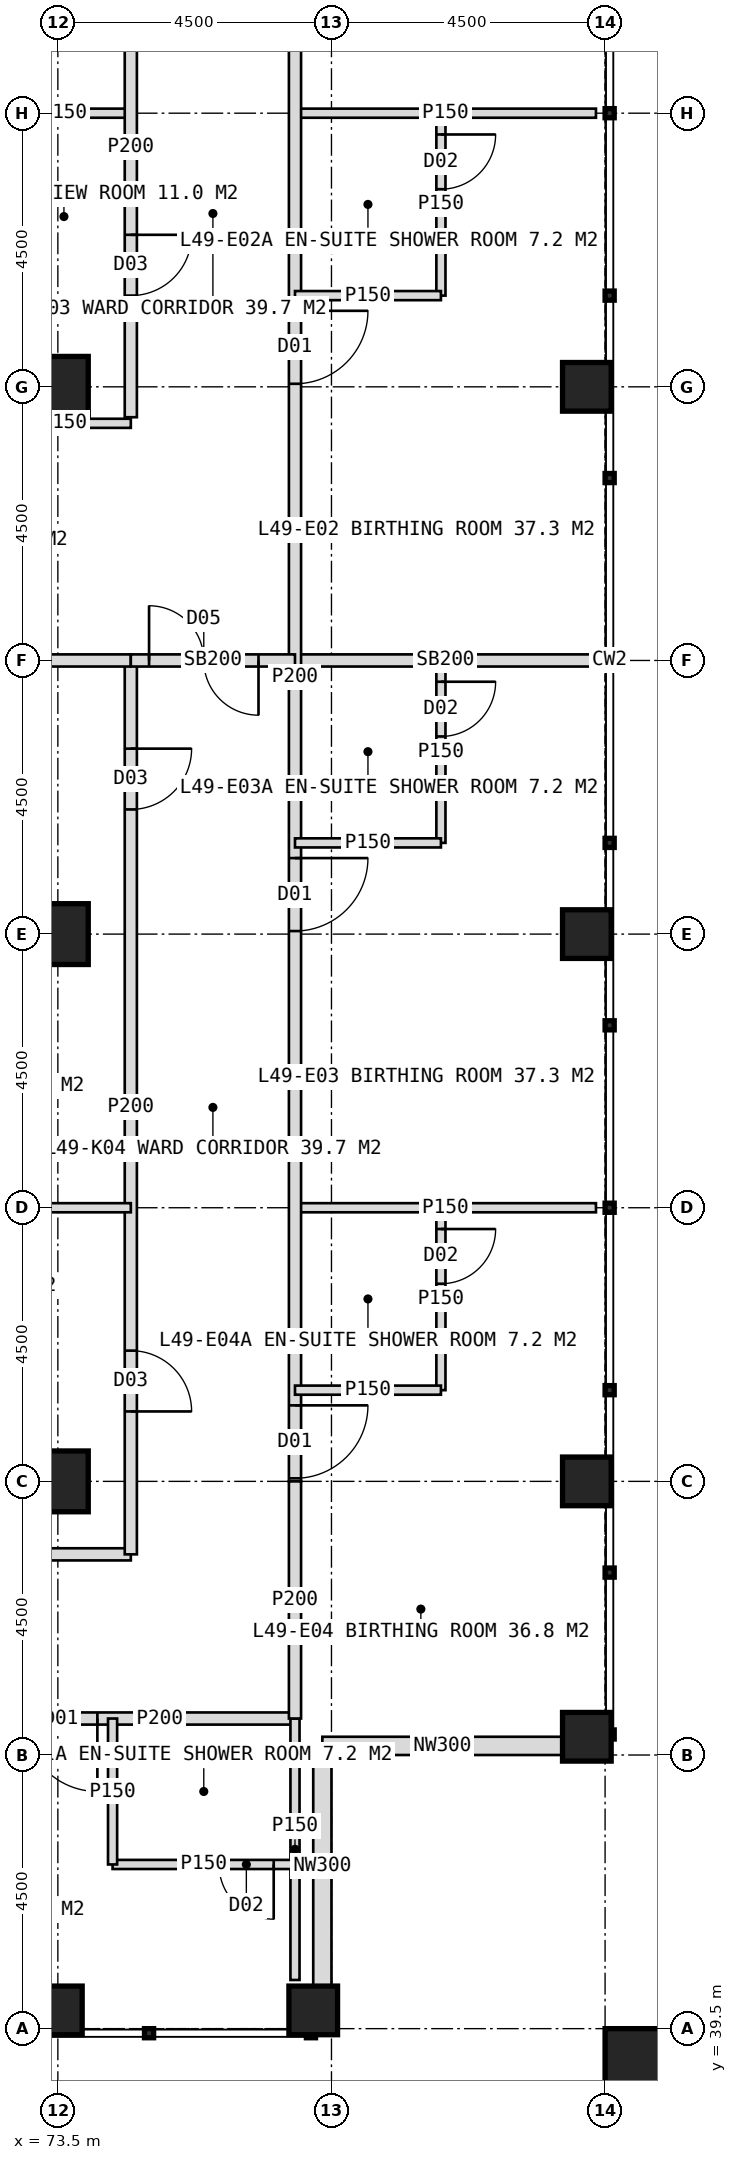
"""IFC4 building model, lengths in metres.
Left out: names, types, materials, properties, quantities, classifications, styles, units other than length and angle.
Written with IfcOpenShell. Run it as: python <this file> out.ifc"""

import sys

from ifc_helpers import new_model, si_unit, direction, frame, frame_2d, origin, origin_2d, place, context, subcontext, project, spatial, rectangle, hollow_rectangle, extrude, element, fill, save


model = new_model("IFC4")
c1 = context("Model", 3, precision=1e-05, world=origin(), true_north=direction((0.0, 1.0)))
c2 = subcontext(c1, "Body", "Model", "MODEL_VIEW")
j1 = project(units=[si_unit("LENGTHUNIT", "METRE"), si_unit("PLANEANGLEUNIT", "RADIAN")], contexts=[c1])
p1 = place(None, origin())
s1 = spatial("IfcSite", under=j1, at=p1, CompositionType="ELEMENT")
p2 = place(p1, origin())
s2 = spatial("IfcBuilding", under=s1, at=p2, CompositionType="ELEMENT")
p3 = place(p2, frame((0.0, 0.0, 205.0)))
s3 = spatial("IfcBuildingStorey", under=s2, at=p3, CompositionType="ELEMENT", Elevation=205.0)
for number, where, z_axis, x_axis in (
    (1, (73.5, 48.5, 0.0), (0.0, 0.0, 1.0), (1.0, 0.0, 0.0)),
    (2, (73.5, 57.5, 0.0), (0.0, 0.0, 1.0), (1.0, 0.0, 0.0)),
    (3, (73.5, 66.5, 0.0), (0.0, 0.0, 1.0), (1.0, 0.0, 0.0)),
):
    element("IfcColumn", number, at=place(p3, frame(where, z_axis=z_axis, x_axis=x_axis)), inside=s3, PredefinedType="COLUMN", context=c2, shape_type="SweptSolid", body=[
        extrude(hollow_rectangle(XDim=1.0, YDim=1.0, WallThickness=0.1, at=origin_2d()), origin(), (0.0, 0.0, 1.0), 4.0),
    ])
for number, where, z_axis, x_axis in (
    (4, (82.2, 44.3, 0.0), (0.0, 0.0, 1.0), (1.0, 0.0, 0.0)),
    (5, (82.2, 48.5, 0.0), (0.0, 0.0, 1.0), (1.0, 0.0, 0.0)),
    (6, (82.2, 57.5, 0.0), (0.0, 0.0, 1.0), (1.0, 0.0, 0.0)),
    (7, (82.2, 66.5, 0.0), (0.0, 0.0, 1.0), (1.0, 0.0, 0.0)),
    (8, (73.5, 39.8, 0.0), (0.0, 0.0, 1.0), (1.0, 0.0, 0.0)),
    (9, (77.7, 39.8, 0.0), (0.0, 0.0, 1.0), (1.0, 0.0, 0.0)),
):
    element("IfcColumn", number, at=place(p3, frame(where, z_axis=z_axis, x_axis=x_axis)), inside=s3, PredefinedType="COLUMN", context=c2, shape_type="SweptSolid", body=[
        extrude(hollow_rectangle(XDim=0.8, YDim=0.8, WallThickness=0.08, at=origin_2d()), origin(), (0.0, 0.0, 1.0), 4.0),
    ])
p4 = place(p3, frame((83.1, 38.9, 0.0), z_axis=(0.0, 0.0, 1.0), x_axis=(1.0, 0.0, 0.0)))
e10 = element("IfcColumn", 10, at=p4, inside=s3, PredefinedType="COLUMN", context=c2, shape_type="SweptSolid", body=[
    extrude(hollow_rectangle(XDim=1.2, YDim=1.2, WallThickness=0.07, at=origin_2d()), origin(), (0.0, 0.0, 1.0), 4.0),
])
for number, where, z_axis, x_axis in (
    (11, (81.8, 44.15, 0.0), (0.0, 0.0, 1.0), (-1.0, 0.0, 0.0)),
    (12, (77.85, 44.15, 0.0), (0.0, 0.0, 1.0), (0.0, -1.0, 0.0)),
):
    element("IfcWall", number, at=place(p3, frame(where, z_axis=z_axis, x_axis=x_axis)), inside=s3, PredefinedType="ELEMENTEDWALL", context=c2, shape_type="SweptSolid", body=[
        extrude(rectangle(XDim=3.95, YDim=0.3, at=frame_2d((1.975, 0.0))), origin(), (0.0, 0.0, 1.0), 2.85),
    ])
p5 = place(p3, frame((77.4, 44.6, 0.0), z_axis=(0.0, 0.0, 1.0), x_axis=(-1.0, 0.0, 0.0)))
e13 = element("IfcWall", 13, at=p5, inside=s3, PredefinedType="PARTITIONING", context=c2, shape_type="SweptSolid", body=[
    extrude(rectangle(XDim=4.45, YDim=0.2, at=frame_2d((2.225, 0.0))), origin(), (0.0, 0.0, 1.0), 2.85),
])
p6 = place(p5, frame((3.25, 0.0, 0.0)))
e14 = element("IfcOpeningElement", 14, at=p6, cuts=e13, PredefinedType="OPENING", context=c2, shape_type="SweptSolid", body=[
    extrude(rectangle(XDim=1.2, YDim=2.2, at=frame_2d((0.6, 1.1))), frame((0.0, 0.11, 0.0), z_axis=(0.0, -1.0, 0.0), x_axis=(1.0, 0.0, 0.0)), (0.0, 0.0, 1.0), 0.22),
])
p7 = place(p3, frame((77.4, 44.6, 0.0), z_axis=(0.0, 0.0, 1.0), x_axis=(0.0, -1.0, 0.0)))
e15 = element("IfcWall", 15, at=p7, inside=s3, PredefinedType="PARTITIONING", context=c2, shape_type="SweptSolid", body=[
    extrude(rectangle(XDim=4.3, YDim=0.15, at=frame_2d((2.15, 0.0))), origin(), (0.0, 0.0, 1.0), 2.85),
])
p8 = place(p3, frame((77.4, 42.2, 0.0), z_axis=(0.0, 0.0, 1.0), x_axis=(-1.0, 0.0, 0.0)))
e16 = element("IfcWall", 16, at=p8, inside=s3, PredefinedType="PARTITIONING", context=c2, shape_type="SweptSolid", body=[
    extrude(rectangle(XDim=3.0, YDim=0.15, at=frame_2d((1.5, 0.0))), origin(), (0.0, 0.0, 1.0), 3.75),
])
p9 = place(p8, frame((0.35, 0.0, 0.0)))
e17 = element("IfcOpeningElement", 17, at=p9, cuts=e16, PredefinedType="OPENING", context=c2, shape_type="SweptSolid", body=[
    extrude(rectangle(XDim=0.9, YDim=2.1, at=frame_2d((0.45, 1.05))), frame((0.0, 0.085, 0.0), z_axis=(0.0, -1.0, 0.0), x_axis=(1.0, 0.0, 0.0)), (0.0, 0.0, 1.0), 0.17),
])
p10 = place(p3, frame((74.4, 44.6, 0.0), z_axis=(0.0, 0.0, 1.0), x_axis=(0.0, -1.0, 0.0)))
e18 = element("IfcWall", 18, at=p10, inside=s3, PredefinedType="PARTITIONING", context=c2, shape_type="SweptSolid", body=[
    extrude(rectangle(XDim=2.4, YDim=0.15, at=frame_2d((1.2, 0.0))), origin(), (0.0, 0.0, 1.0), 3.75),
])
p11 = place(p3, frame((74.7, 47.3, 0.0), z_axis=(0.0, 0.0, 1.0), x_axis=(-1.0, 0.0, 0.0)))
e19 = element("IfcWall", 19, at=p11, inside=s3, PredefinedType="PARTITIONING", context=c2, shape_type="SweptSolid", body=[
    extrude(rectangle(XDim=5.7, YDim=0.2, at=frame_2d((2.85, 0.0))), origin(), (0.0, 0.0, 1.0), 3.75),
])
p12 = place(p3, frame((77.4, 71.0, 0.0), z_axis=(0.0, 0.0, 1.0), x_axis=(1.0, 0.0, 0.0)))
e20 = element("IfcWall", 20, at=p12, inside=s3, PredefinedType="PARTITIONING", context=c2, shape_type="SweptSolid", body=[
    extrude(rectangle(XDim=4.95, YDim=0.15, at=frame_2d((2.475, 0.0))), origin(), (0.0, 0.0, 1.0), 3.75),
])
p13 = place(p3, frame((77.4, 62.0, 0.0), z_axis=(0.0, 0.0, 1.0), x_axis=(1.0, 0.0, 0.0)))
e21 = element("IfcWall", 21, at=p13, inside=s3, PredefinedType="SOLIDWALL", context=c2, shape_type="SweptSolid", body=[
    extrude(rectangle(XDim=4.95, YDim=0.2, at=frame_2d((2.475, 0.0))), origin(), (0.0, 0.0, 1.0), 2.95),
])
p14 = place(p3, frame((77.4, 53.0, 0.0), z_axis=(0.0, 0.0, 1.0), x_axis=(1.0, 0.0, 0.0)))
e22 = element("IfcWall", 22, at=p14, inside=s3, PredefinedType="PARTITIONING", context=c2, shape_type="SweptSolid", body=[
    extrude(rectangle(XDim=4.95, YDim=0.15, at=frame_2d((2.475, 0.0))), origin(), (0.0, 0.0, 1.0), 3.75),
])
p15 = place(p3, frame((77.4, 74.95, 0.0), z_axis=(0.0, 0.0, 1.0), x_axis=(0.0, -1.0, 0.0)))
e23 = element("IfcWall", 23, at=p15, inside=s3, PredefinedType="PARTITIONING", context=c2, shape_type="SweptSolid", body=[
    extrude(rectangle(XDim=26.45, YDim=0.2, at=frame_2d((13.225, 0.0))), origin(), (0.0, 0.0, 1.0), 3.75),
])
p16 = place(p15, frame((7.2, 0.0, 0.0)))
e24 = element("IfcOpeningElement", 24, at=p16, cuts=e23, PredefinedType="OPENING", context=c2, shape_type="SweptSolid", body=[
    extrude(rectangle(XDim=1.2, YDim=2.2, at=frame_2d((0.6, 1.1))), frame((0.0, 0.11, 0.0), z_axis=(0.0, -1.0, 0.0), x_axis=(1.0, 0.0, 0.0)), (0.0, 0.0, 1.0), 0.22),
])
p17 = place(p15, frame((16.2, 0.0, 0.0)))
e25 = element("IfcOpeningElement", 25, at=p17, cuts=e23, PredefinedType="OPENING", context=c2, shape_type="SweptSolid", body=[
    extrude(rectangle(XDim=1.2, YDim=2.2, at=frame_2d((0.6, 1.1))), frame((0.0, 0.11, 0.0), z_axis=(0.0, -1.0, 0.0), x_axis=(1.0, 0.0, 0.0)), (0.0, 0.0, 1.0), 0.22),
])
p18 = place(p15, frame((25.2, 0.0, 0.0)))
e26 = element("IfcOpeningElement", 26, at=p18, cuts=e23, PredefinedType="OPENING", context=c2, shape_type="SweptSolid", body=[
    extrude(rectangle(XDim=1.2, YDim=2.2, at=frame_2d((0.6, 1.1))), frame((0.0, 0.11, 0.0), z_axis=(0.0, -1.0, 0.0), x_axis=(1.0, 0.0, 0.0)), (0.0, 0.0, 1.0), 0.22),
])
p19 = place(p3, frame((77.4, 48.5, 0.0), z_axis=(0.0, 0.0, 1.0), x_axis=(0.0, -1.0, 0.0)))
e27 = element("IfcWall", 27, at=p19, inside=s3, PredefinedType="PARTITIONING", context=c2, shape_type="SweptSolid", body=[
    extrude(rectangle(XDim=3.9, YDim=0.2, at=frame_2d((1.95, 0.0))), origin(), (0.0, 0.0, 1.0), 2.85),
])
p20 = place(p3, frame((79.8, 71.0, 0.0), z_axis=(0.0, 0.0, 1.0), x_axis=(0.0, -1.0, 0.0)))
e28 = element("IfcWall", 28, at=p20, inside=s3, PredefinedType="PARTITIONING", context=c2, shape_type="SweptSolid", body=[
    extrude(rectangle(XDim=3.0, YDim=0.15, at=frame_2d((1.5, 0.0))), origin(), (0.0, 0.0, 1.0), 3.75),
])
p21 = place(p20, frame((0.35, 0.0, 0.0)))
e29 = element("IfcOpeningElement", 29, at=p21, cuts=e28, PredefinedType="OPENING", context=c2, shape_type="SweptSolid", body=[
    extrude(rectangle(XDim=0.9, YDim=2.1, at=frame_2d((0.45, 1.05))), frame((0.0, 0.085, 0.0), z_axis=(0.0, -1.0, 0.0), x_axis=(1.0, 0.0, 0.0)), (0.0, 0.0, 1.0), 0.17),
])
p22 = place(p3, frame((77.4, 68.0, 0.0), z_axis=(0.0, 0.0, 1.0), x_axis=(1.0, 0.0, 0.0)))
e30 = element("IfcWall", 30, at=p22, inside=s3, PredefinedType="PARTITIONING", context=c2, shape_type="SweptSolid", body=[
    extrude(rectangle(XDim=2.4, YDim=0.15, at=frame_2d((1.2, 0.0))), origin(), (0.0, 0.0, 1.0), 3.75),
])
p23 = place(p3, frame((79.8, 62.0, 0.0), z_axis=(0.0, 0.0, 1.0), x_axis=(0.0, -1.0, 0.0)))
e31 = element("IfcWall", 31, at=p23, inside=s3, PredefinedType="PARTITIONING", context=c2, shape_type="SweptSolid", body=[
    extrude(rectangle(XDim=3.0, YDim=0.15, at=frame_2d((1.5, 0.0))), origin(), (0.0, 0.0, 1.0), 3.75),
])
p24 = place(p23, frame((0.35, 0.0, 0.0)))
e32 = element("IfcOpeningElement", 32, at=p24, cuts=e31, PredefinedType="OPENING", context=c2, shape_type="SweptSolid", body=[
    extrude(rectangle(XDim=0.9, YDim=2.1, at=frame_2d((0.45, 1.05))), frame((0.0, 0.085, 0.0), z_axis=(0.0, -1.0, 0.0), x_axis=(1.0, 0.0, 0.0)), (0.0, 0.0, 1.0), 0.17),
])
p25 = place(p3, frame((77.4, 59.0, 0.0), z_axis=(0.0, 0.0, 1.0), x_axis=(1.0, 0.0, 0.0)))
e33 = element("IfcWall", 33, at=p25, inside=s3, PredefinedType="PARTITIONING", context=c2, shape_type="SweptSolid", body=[
    extrude(rectangle(XDim=2.4, YDim=0.15, at=frame_2d((1.2, 0.0))), origin(), (0.0, 0.0, 1.0), 3.75),
])
p26 = place(p3, frame((79.8, 53.0, 0.0), z_axis=(0.0, 0.0, 1.0), x_axis=(0.0, -1.0, 0.0)))
e34 = element("IfcWall", 34, at=p26, inside=s3, PredefinedType="PARTITIONING", context=c2, shape_type="SweptSolid", body=[
    extrude(rectangle(XDim=3.0, YDim=0.15, at=frame_2d((1.5, 0.0))), origin(), (0.0, 0.0, 1.0), 3.75),
])
p27 = place(p26, frame((0.35, 0.0, 0.0)))
e35 = element("IfcOpeningElement", 35, at=p27, cuts=e34, PredefinedType="OPENING", context=c2, shape_type="SweptSolid", body=[
    extrude(rectangle(XDim=0.9, YDim=2.1, at=frame_2d((0.45, 1.05))), frame((0.0, 0.085, 0.0), z_axis=(0.0, -1.0, 0.0), x_axis=(1.0, 0.0, 0.0)), (0.0, 0.0, 1.0), 0.17),
])
p28 = place(p3, frame((77.4, 50.0, 0.0), z_axis=(0.0, 0.0, 1.0), x_axis=(1.0, 0.0, 0.0)))
e36 = element("IfcWall", 36, at=p28, inside=s3, PredefinedType="PARTITIONING", context=c2, shape_type="SweptSolid", body=[
    extrude(rectangle(XDim=2.4, YDim=0.15, at=frame_2d((1.2, 0.0))), origin(), (0.0, 0.0, 1.0), 3.75),
])
p29 = place(p3, frame((72.5, 71.0, 0.0), z_axis=(0.0, 0.0, 1.0), x_axis=(1.0, 0.0, 0.0)))
e37 = element("IfcWall", 37, at=p29, inside=s3, PredefinedType="PARTITIONING", context=c2, shape_type="SweptSolid", body=[
    extrude(rectangle(XDim=2.2, YDim=0.15, at=frame_2d((1.1, 0.0))), origin(), (0.0, 0.0, 1.0), 3.75),
])
p30 = place(p3, frame((74.7, 74.9, 0.0), z_axis=(0.0, 0.0, 1.0), x_axis=(0.0, -1.0, 0.0)))
e38 = element("IfcWall", 38, at=p30, inside=s3, PredefinedType="PARTITIONING", context=c2, shape_type="SweptSolid", body=[
    extrude(rectangle(XDim=8.9, YDim=0.2, at=frame_2d((4.45, 0.0))), origin(), (0.0, 0.0, 1.0), 3.75),
])
p31 = place(p30, frame((0.25, 0.0, 0.0)))
e39 = element("IfcOpeningElement", 39, at=p31, cuts=e38, PredefinedType="OPENING", context=c2, shape_type="SweptSolid", body=[
    extrude(rectangle(XDim=1.0, YDim=2.1, at=frame_2d((0.5, 1.05))), frame((0.0, 0.11, 0.0), z_axis=(0.0, -1.0, 0.0), x_axis=(1.0, 0.0, 0.0)), (0.0, 0.0, 1.0), 0.22),
])
p32 = place(p30, frame((5.9, 0.0, 0.0)))
e40 = element("IfcOpeningElement", 40, at=p32, cuts=e38, PredefinedType="OPENING", context=c2, shape_type="SweptSolid", body=[
    extrude(rectangle(XDim=1.0, YDim=2.1, at=frame_2d((0.5, 1.05))), frame((0.0, 0.11, 0.0), z_axis=(0.0, -1.0, 0.0), x_axis=(1.0, 0.0, 0.0)), (0.0, 0.0, 1.0), 0.22),
])
p33 = place(p3, frame((74.7, 62.0, 0.0), z_axis=(0.0, 0.0, 1.0), x_axis=(0.0, -1.0, 0.0)))
e41 = element("IfcWall", 41, at=p33, inside=s3, PredefinedType="PARTITIONING", context=c2, shape_type="SweptSolid", body=[
    extrude(rectangle(XDim=14.7, YDim=0.2, at=frame_2d((7.35, 0.0))), origin(), (0.0, 0.0, 1.0), 3.75),
])
p34 = place(p33, frame((1.45, 0.0, 0.0)))
e42 = element("IfcOpeningElement", 42, at=p34, cuts=e41, PredefinedType="OPENING", context=c2, shape_type="SweptSolid", body=[
    extrude(rectangle(XDim=1.0, YDim=2.1, at=frame_2d((0.5, 1.05))), frame((0.0, 0.11, 0.0), z_axis=(0.0, -1.0, 0.0), x_axis=(1.0, 0.0, 0.0)), (0.0, 0.0, 1.0), 0.22),
])
p35 = place(p33, frame((11.35, 0.0, 0.0)))
e43 = element("IfcOpeningElement", 43, at=p35, cuts=e41, PredefinedType="OPENING", context=c2, shape_type="SweptSolid", body=[
    extrude(rectangle(XDim=1.0, YDim=2.1, at=frame_2d((0.5, 1.05))), frame((0.0, 0.11, 0.0), z_axis=(0.0, -1.0, 0.0), x_axis=(1.0, 0.0, 0.0)), (0.0, 0.0, 1.0), 0.22),
])
p36 = place(p3, frame((72.5, 65.9, 0.0), z_axis=(0.0, 0.0, 1.0), x_axis=(1.0, 0.0, 0.0)))
e44 = element("IfcWall", 44, at=p36, inside=s3, PredefinedType="PARTITIONING", context=c2, shape_type="SweptSolid", body=[
    extrude(rectangle(XDim=2.2, YDim=0.15, at=frame_2d((1.1, 0.0))), origin(), (0.0, 0.0, 1.0), 3.75),
])
p37 = place(p3, frame((69.0, 62.0, 0.0), z_axis=(0.0, 0.0, 1.0), x_axis=(1.0, 0.0, 0.0)))
e45 = element("IfcWall", 45, at=p37, inside=s3, PredefinedType="SOLIDWALL", context=c2, shape_type="SweptSolid", body=[
    extrude(rectangle(XDim=5.7, YDim=0.2, at=frame_2d((2.85, 0.0))), origin(), (0.0, 0.0, 1.0), 2.95),
])
p38 = place(p3, frame((69.0, 53.0, 0.0), z_axis=(0.0, 0.0, 1.0), x_axis=(1.0, 0.0, 0.0)))
e46 = element("IfcWall", 46, at=p38, inside=s3, PredefinedType="PARTITIONING", context=c2, shape_type="SweptSolid", body=[
    extrude(rectangle(XDim=5.7, YDim=0.15, at=frame_2d((2.85, 0.0))), origin(), (0.0, 0.0, 1.0), 3.75),
])
p39 = place(p3, frame((74.7, 62.0, 0.0), z_axis=(0.0, 0.0, 1.0), x_axis=(1.0, 0.0, 0.0)))
e47 = element("IfcWall", 47, at=p39, inside=s3, PredefinedType="SOLIDWALL", context=c2, shape_type="SweptSolid", body=[
    extrude(rectangle(XDim=2.7, YDim=0.2, at=frame_2d((1.35, 0.0))), origin(), (0.0, 0.0, 1.0), 2.95),
])
p40 = place(p39, frame((0.3, 0.0, 0.0)))
e48 = element("IfcOpeningElement", 48, at=p40, cuts=e47, PredefinedType="OPENING", context=c2, shape_type="SweptSolid", body=[
    extrude(rectangle(XDim=1.8, YDim=2.2, at=frame_2d((0.9, 1.1))), frame((0.0, 0.11, 0.0), z_axis=(0.0, -1.0, 0.0), x_axis=(1.0, 0.0, 0.0)), (0.0, 0.0, 1.0), 0.22),
])
p41 = place(p6, origin())
e49 = element("IfcDoor", 49, at=p41, inside=s3, OperationType="SINGLE_SWING_LEFT", PredefinedType="DOOR", context=c2, shape_type="SweptSolid", body=[
    extrude(rectangle(XDim=1.2, YDim=2.2, at=frame_2d((0.6, 1.1))), frame((0.0, 0.025, 0.0), z_axis=(0.0, -1.0, 0.0), x_axis=(1.0, 0.0, 0.0)), (0.0, 0.0, 1.0), 0.05),
])
fill(e14, e49)
p42 = place(p9, origin())
e50 = element("IfcDoor", 50, at=p42, inside=s3, OperationType="SINGLE_SWING_LEFT", PredefinedType="DOOR", context=c2, shape_type="SweptSolid", body=[
    extrude(rectangle(XDim=0.9, YDim=2.1, at=frame_2d((0.45, 1.05))), frame((0.0, 0.025, 0.0), z_axis=(0.0, -1.0, 0.0), x_axis=(1.0, 0.0, 0.0)), (0.0, 0.0, 1.0), 0.05),
])
fill(e17, e50)
p43 = place(p16, origin())
e51 = element("IfcDoor", 51, at=p43, inside=s3, OperationType="SINGLE_SWING_LEFT", PredefinedType="DOOR", context=c2, shape_type="SweptSolid", body=[
    extrude(rectangle(XDim=1.2, YDim=2.2, at=frame_2d((0.6, 1.1))), frame((0.0, 0.025, 0.0), z_axis=(0.0, -1.0, 0.0), x_axis=(1.0, 0.0, 0.0)), (0.0, 0.0, 1.0), 0.05),
])
fill(e24, e51)
p44 = place(p21, origin())
e52 = element("IfcDoor", 52, at=p44, inside=s3, OperationType="SINGLE_SWING_LEFT", PredefinedType="DOOR", context=c2, shape_type="SweptSolid", body=[
    extrude(rectangle(XDim=0.9, YDim=2.1, at=frame_2d((0.45, 1.05))), frame((0.0, 0.025, 0.0), z_axis=(0.0, -1.0, 0.0), x_axis=(1.0, 0.0, 0.0)), (0.0, 0.0, 1.0), 0.05),
])
fill(e29, e52)
p45 = place(p17, origin())
e53 = element("IfcDoor", 53, at=p45, inside=s3, OperationType="SINGLE_SWING_LEFT", PredefinedType="DOOR", context=c2, shape_type="SweptSolid", body=[
    extrude(rectangle(XDim=1.2, YDim=2.2, at=frame_2d((0.6, 1.1))), frame((0.0, 0.025, 0.0), z_axis=(0.0, -1.0, 0.0), x_axis=(1.0, 0.0, 0.0)), (0.0, 0.0, 1.0), 0.05),
])
fill(e25, e53)
p46 = place(p24, origin())
e54 = element("IfcDoor", 54, at=p46, inside=s3, OperationType="SINGLE_SWING_LEFT", PredefinedType="DOOR", context=c2, shape_type="SweptSolid", body=[
    extrude(rectangle(XDim=0.9, YDim=2.1, at=frame_2d((0.45, 1.05))), frame((0.0, 0.025, 0.0), z_axis=(0.0, -1.0, 0.0), x_axis=(1.0, 0.0, 0.0)), (0.0, 0.0, 1.0), 0.05),
])
fill(e32, e54)
p47 = place(p18, origin())
e55 = element("IfcDoor", 55, at=p47, inside=s3, OperationType="SINGLE_SWING_LEFT", PredefinedType="DOOR", context=c2, shape_type="SweptSolid", body=[
    extrude(rectangle(XDim=1.2, YDim=2.2, at=frame_2d((0.6, 1.1))), frame((0.0, 0.025, 0.0), z_axis=(0.0, -1.0, 0.0), x_axis=(1.0, 0.0, 0.0)), (0.0, 0.0, 1.0), 0.05),
])
fill(e26, e55)
p48 = place(p27, origin())
e56 = element("IfcDoor", 56, at=p48, inside=s3, OperationType="SINGLE_SWING_LEFT", PredefinedType="DOOR", context=c2, shape_type="SweptSolid", body=[
    extrude(rectangle(XDim=0.9, YDim=2.1, at=frame_2d((0.45, 1.05))), frame((0.0, 0.025, 0.0), z_axis=(0.0, -1.0, 0.0), x_axis=(1.0, 0.0, 0.0)), (0.0, 0.0, 1.0), 0.05),
])
fill(e35, e56)
p49 = place(p32, origin())
e57 = element("IfcDoor", 57, at=p49, inside=s3, OperationType="SINGLE_SWING_LEFT", PredefinedType="DOOR", context=c2, shape_type="SweptSolid", body=[
    extrude(rectangle(XDim=1.0, YDim=2.1, at=frame_2d((0.5, 1.05))), frame((0.0, 0.025, 0.0), z_axis=(0.0, -1.0, 0.0), x_axis=(1.0, 0.0, 0.0)), (0.0, 0.0, 1.0), 0.05),
])
fill(e40, e57)
p50 = place(p34, origin())
e58 = element("IfcDoor", 58, at=p50, inside=s3, OperationType="SINGLE_SWING_LEFT", PredefinedType="DOOR", context=c2, shape_type="SweptSolid", body=[
    extrude(rectangle(XDim=1.0, YDim=2.1, at=frame_2d((0.5, 1.05))), frame((0.0, 0.025, 0.0), z_axis=(0.0, -1.0, 0.0), x_axis=(1.0, 0.0, 0.0)), (0.0, 0.0, 1.0), 0.05),
])
fill(e42, e58)
p51 = place(p35, origin())
e59 = element("IfcDoor", 59, at=p51, inside=s3, OperationType="SINGLE_SWING_RIGHT", PredefinedType="DOOR", context=c2, shape_type="SweptSolid", body=[
    extrude(rectangle(XDim=1.0, YDim=2.1, at=frame_2d((0.5, 1.05))), frame((0.0, 0.025, 0.0), z_axis=(0.0, -1.0, 0.0), x_axis=(1.0, 0.0, 0.0)), (0.0, 0.0, 1.0), 0.05),
])
fill(e43, e59)
p52 = place(p40, origin())
e60 = element("IfcDoor", 60, at=p52, inside=s3, OperationType="DOUBLE_DOOR_DOUBLE_SWING", PredefinedType="DOOR", context=c2, shape_type="SweptSolid", body=[
    extrude(rectangle(XDim=1.8, YDim=2.2, at=frame_2d((0.9, 1.1))), frame((0.0, 0.025, 0.0), z_axis=(0.0, -1.0, 0.0), x_axis=(1.0, 0.0, 0.0)), (0.0, 0.0, 1.0), 0.05),
])
fill(e48, e60)
save(model, sys.argv[1])
